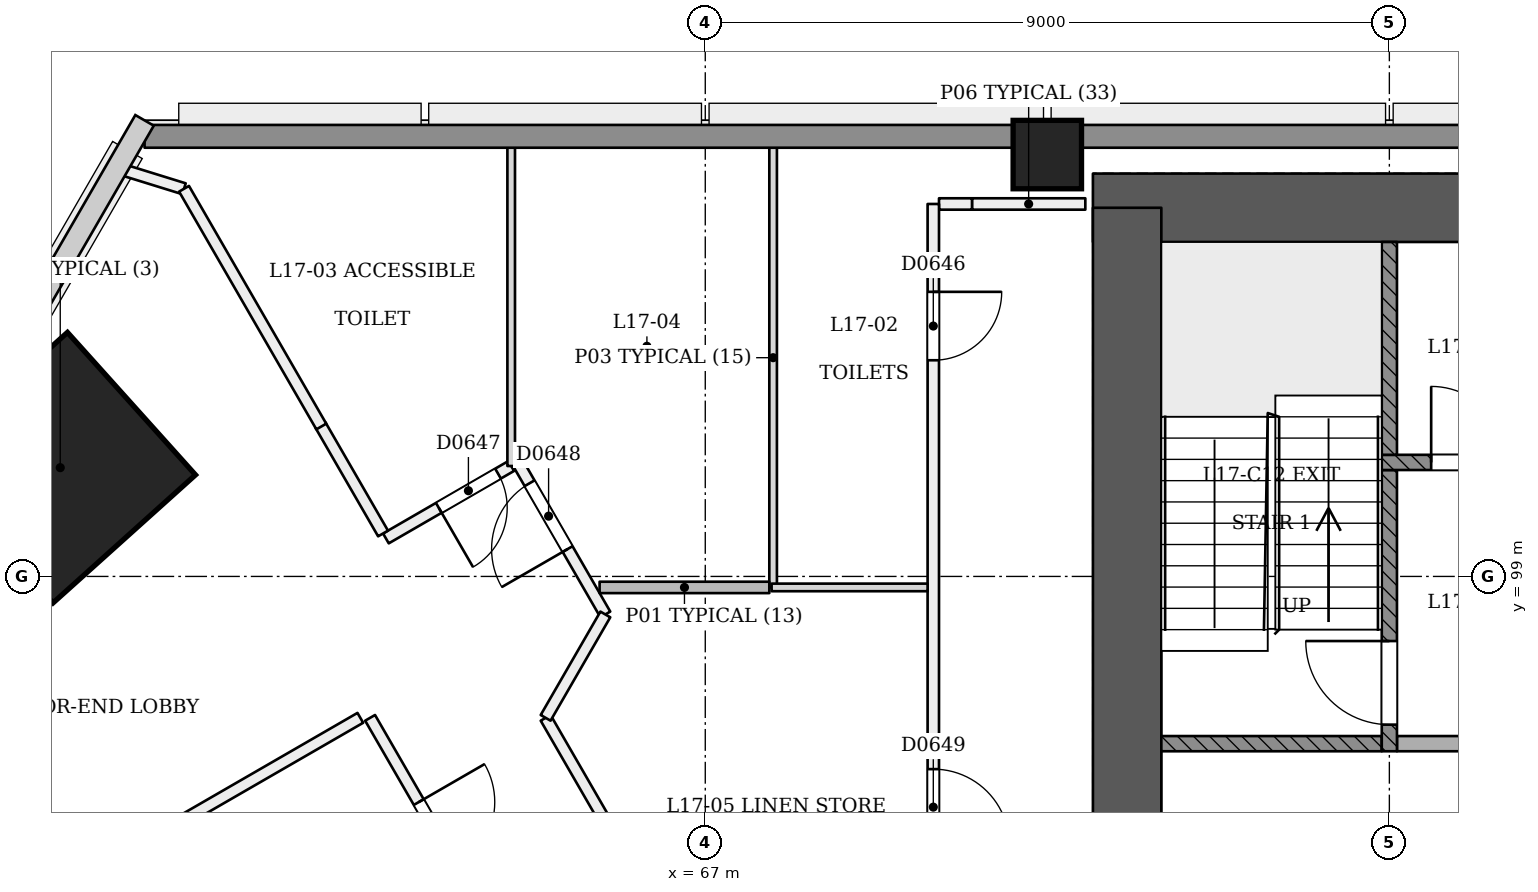
"""IFC4 building model, lengths in metres.
Left out: names, types, materials, properties, quantities, classifications, styles, units other than length and angle.
Written with IfcOpenShell. Run it as: python <this file> out.ifc"""

import sys

from ifc_helpers import new_model, si_unit, direction, frame, frame_2d, origin, origin_2d, place, context, subcontext, project, spatial, rectangle, extrude, element, fill, save


model = new_model("IFC4")
c1 = context("Model", 3, precision=1e-05, world=origin(), true_north=direction((0.0, 1.0)))
c2 = subcontext(c1, "Body", "Model", "MODEL_VIEW")
j1 = project(units=[si_unit("LENGTHUNIT", "METRE"), si_unit("PLANEANGLEUNIT", "RADIAN")], contexts=[c1])
p1 = place(None, origin())
s1 = spatial("IfcSite", under=j1, at=p1, CompositionType="ELEMENT")
p2 = place(p1, origin())
s2 = spatial("IfcBuilding", under=s1, at=p2, CompositionType="ELEMENT")
p3 = place(p2, frame((0.0, 0.0, 70.2)))
s3 = spatial("IfcBuildingStorey", under=s2, at=p3, CompositionType="ELEMENT", Elevation=70.2)
p4 = place(p3, frame((97.45, 103.85, 0.0), z_axis=(0.0, 0.0, 1.0), x_axis=(-1.0, 0.0, 0.0)))
e1 = element("IfcWall", 1, at=p4, inside=s3, PredefinedType="SHEAR", context=c2, shape_type="SweptSolid", body=[
    extrude(rectangle(XDim=25.35, YDim=0.9, at=frame_2d((12.675, 0.0))), origin(), (0.0, 0.0, 1.0), 3.6),
])
p5 = place(p3, frame((72.55, 103.85, 0.0), z_axis=(0.0, 0.0, 1.0), x_axis=(0.0, -1.0, 0.0)))
e2 = element("IfcWall", 2, at=p5, inside=s3, PredefinedType="SHEAR", context=c2, shape_type="SweptSolid", body=[
    extrude(rectangle(XDim=11.35, YDim=0.9, at=frame_2d((5.675, 0.0))), origin(), (0.0, 0.0, 1.0), 3.6),
])
p6 = place(p3, frame((58.48, 100.42, 0.0), z_axis=(0.028401814599, 0.009218727412, 0.999554076572), x_axis=(-0.865120105842, 0.501167447702, 0.019959755287)))
e3 = element("IfcColumn", 3, at=p6, inside=s3, PredefinedType="COLUMN", context=c2, shape_type="SweptSolid", body=[
    extrude(rectangle(XDim=2.52, YDim=2.52, at=origin_2d()), origin(), (0.0, 0.0, 1.0), 3.602),
])
p7 = place(p3, frame((71.5, 104.55, 0.0), z_axis=(0.0, 0.0, 1.0), x_axis=(1.0, 0.0, 0.0)))
e4 = element("IfcColumn", 4, at=p7, inside=s3, PredefinedType="COLUMN", context=c2, shape_type="SweptSolid", body=[
    extrude(rectangle(XDim=0.9, YDim=0.9, at=origin_2d()), origin(), (0.0, 0.0, 1.0), 3.6),
])
p8 = place(p3, frame((72.0, 103.9, 0.0), z_axis=(0.0, 0.0, 1.0), x_axis=(-1.0, 0.0, 0.0)))
e5 = element("IfcWall", 5, at=p8, inside=s3, PredefinedType="PARTITIONING", context=c2, shape_type="SweptSolid", body=[
    extrude(rectangle(XDim=1.491, YDim=0.15, at=frame_2d((0.746, 0.0))), origin(), (0.0, 0.0, 1.0), 3.1),
])
p9 = place(p3, frame((70.509, 103.9, 0.0), z_axis=(0.0, 0.0, 1.0), x_axis=(-1.0, 0.0, 0.0)))
e6 = element("IfcWall", 6, at=p9, inside=s3, PredefinedType="PARTITIONING", context=c2, shape_type="SweptSolid", body=[
    extrude(rectangle(XDim=0.434, YDim=0.15, at=frame_2d((0.217, 0.0))), origin(), (0.0, 0.0, 1.0), 2.6),
])
p10 = place(p3, frame((64.447, 100.453, 0.0), z_axis=(0.0, 0.0, 1.0), x_axis=(-0.865753934511, -0.500469904069, 0.0)))
e7 = element("IfcWall", 7, at=p10, inside=s3, PredefinedType="PARTITIONING", context=c2, shape_type="SweptSolid", body=[
    extrude(rectangle(XDim=1.904, YDim=0.15, at=frame_2d((0.952, 0.0))), origin(), (0.0, 0.0, 1.0), 3.1),
])
p11 = place(p10, frame((0.2, 0.0, 0.0)))
e8 = element("IfcOpeningElement", 8, at=p11, cuts=e7, PredefinedType="OPENING", context=c2, shape_type="SweptSolid", body=[
    extrude(rectangle(XDim=0.9, YDim=2.1, at=frame_2d((0.45, 1.05))), frame((0.0, 0.085, 0.0), z_axis=(0.0, -1.0, 0.0), x_axis=(1.0, 0.0, 0.0)), (0.0, 0.0, 1.0), 0.171),
])
p12 = place(p3, frame((62.761, 99.565, 0.0), z_axis=(0.0, 0.0, 1.0), x_axis=(-0.50001794124, 0.866015045157, 0.0)))
e9 = element("IfcWall", 9, at=p12, inside=s3, PredefinedType="PARTITIONING", context=c2, shape_type="SweptSolid", body=[
    extrude(rectangle(XDim=1.645, YDim=0.15, at=frame_2d((0.823, 0.0))), origin(), (0.0, 0.0, 1.0), 3.1),
])
p13 = place(p3, frame((65.685, 98.5, 0.0), z_axis=(0.0, 0.0, 1.0), x_axis=(-0.500027479704, 0.866009537788, 0.0)))
e10 = element("IfcWall", 10, at=p13, inside=s3, PredefinedType="PARTITIONING", context=c2, shape_type="SweptSolid", body=[
    extrude(rectangle(XDim=2.309, YDim=0.15, at=frame_2d((1.155, 0.0))), origin(), (0.0, 0.0, 1.0), 3.1),
])
p14 = place(p13, frame((0.993, 0.0, 0.0)))
e11 = element("IfcOpeningElement", 11, at=p14, cuts=e10, PredefinedType="OPENING", context=c2, shape_type="SweptSolid", body=[
    extrude(rectangle(XDim=1.0, YDim=2.1, at=frame_2d((0.5, 1.05))), frame((0.0, 0.085, 0.0), z_axis=(0.0, -1.0, 0.0), x_axis=(1.0, 0.0, 0.0)), (0.0, 0.0, 1.0), 0.171),
])
p15 = place(p3, frame((70.0, 103.9, 0.0), z_axis=(0.0, 0.0, 1.0), x_axis=(0.0, -1.0, 0.0)))
e12 = element("IfcWall", 12, at=p15, inside=s3, PredefinedType="PARTITIONING", context=c2, shape_type="SweptSolid", body=[
    extrude(rectangle(XDim=11.5, YDim=0.15, at=frame_2d((5.75, 0.0))), origin(), (0.0, 0.0, 1.0), 2.6),
])
p16 = place(p15, frame((1.156, 0.0, 0.0)))
e13 = element("IfcOpeningElement", 13, at=p16, cuts=e12, PredefinedType="OPENING", context=c2, shape_type="SweptSolid", body=[
    extrude(rectangle(XDim=0.9, YDim=2.1, at=frame_2d((0.45, 1.05))), frame((0.0, 0.085, 0.0), z_axis=(0.0, -1.0, 0.0), x_axis=(1.0, 0.0, 0.0)), (0.0, 0.0, 1.0), 0.171),
])
p17 = place(p15, frame((7.435, 0.0, 0.0)))
e14 = element("IfcOpeningElement", 14, at=p17, cuts=e12, PredefinedType="OPENING", context=c2, shape_type="SweptSolid", body=[
    extrude(rectangle(XDim=1.0, YDim=2.1, at=frame_2d((0.5, 1.05))), frame((0.0, 0.085, 0.0), z_axis=(0.0, -1.0, 0.0), x_axis=(1.0, 0.0, 0.0)), (0.0, 0.0, 1.0), 0.171),
])
p18 = place(p3, frame((67.636, 92.4, 0.0), z_axis=(0.0, 0.0, 1.0), x_axis=(-0.499977311951, 0.866038502339, 0.0)))
e15 = element("IfcWall", 15, at=p18, inside=s3, PredefinedType="PARTITIONING", context=c2, shape_type="SweptSolid", body=[
    extrude(rectangle(XDim=5.473, YDim=0.15, at=frame_2d((2.736, 0.0))), origin(), (0.0, 0.0, 1.0), 3.1),
])
p19 = place(p3, frame((64.9, 97.14, 0.0), z_axis=(0.0, 0.0, 1.0), x_axis=(0.500000501253, 0.866025114386, 0.0)))
e16 = element("IfcWall", 16, at=p19, inside=s3, PredefinedType="PARTITIONING", context=c2, shape_type="SweptSolid", body=[
    extrude(rectangle(XDim=1.571, YDim=0.15, at=frame_2d((0.785, 0.0))), origin(), (0.0, 0.0, 1.0), 3.1),
])
p20 = place(p3, frame((62.59, 97.14, 0.0), z_axis=(0.0, 0.0, 1.0), x_axis=(0.500002288388, -0.866024082579, 0.0)))
e17 = element("IfcWall", 17, at=p20, inside=s3, PredefinedType="PARTITIONING", context=c2, shape_type="SweptSolid", body=[
    extrude(rectangle(XDim=43.248, YDim=0.15, at=frame_2d((21.624, 0.0))), origin(), (0.0, 0.0, 1.0), 2.7),
])
p21 = place(p20, frame((1.28, 0.0, 0.0)))
e18 = element("IfcOpeningElement", 18, at=p21, cuts=e17, PredefinedType="OPENING", context=c2, shape_type="SweptSolid", body=[
    extrude(rectangle(XDim=1.0, YDim=2.1, at=frame_2d((0.5, 1.05))), frame((0.0, 0.085, 0.0), z_axis=(0.0, -1.0, 0.0), x_axis=(1.0, 0.0, 0.0)), (0.0, 0.0, 1.0), 0.171),
])
p22 = place(p20, frame((4.195, 0.0, 0.0)))
e19 = element("IfcOpeningElement", 19, at=p22, cuts=e17, PredefinedType="OPENING", context=c2, shape_type="SweptSolid", body=[
    extrude(rectangle(XDim=1.1, YDim=2.1, at=frame_2d((0.55, 1.05))), frame((0.0, 0.085, 0.0), z_axis=(0.0, -1.0, 0.0), x_axis=(1.0, 0.0, 0.0)), (0.0, 0.0, 1.0), 0.171),
])
p23 = place(p20, frame((10.904, 0.0, 0.0)))
e20 = element("IfcOpeningElement", 20, at=p23, cuts=e17, PredefinedType="OPENING", context=c2, shape_type="SweptSolid", body=[
    extrude(rectangle(XDim=1.0, YDim=2.1, at=frame_2d((0.5, 1.05))), frame((0.0, 0.085, 0.0), z_axis=(0.0, -1.0, 0.0), x_axis=(1.0, 0.0, 0.0)), (0.0, 0.0, 1.0), 0.171),
])
p24 = place(p20, frame((17.624, 0.0, 0.0)))
e21 = element("IfcOpeningElement", 21, at=p24, cuts=e17, PredefinedType="OPENING", context=c2, shape_type="SweptSolid", body=[
    extrude(rectangle(XDim=1.2, YDim=2.1, at=frame_2d((0.6, 1.05))), frame((0.0, 0.085, 0.0), z_axis=(0.0, -1.0, 0.0), x_axis=(1.0, 0.0, 0.0)), (0.0, 0.0, 1.0), 0.171),
])
p25 = place(p20, frame((22.229, 0.0, 0.0)))
e22 = element("IfcOpeningElement", 22, at=p25, cuts=e17, PredefinedType="OPENING", context=c2, shape_type="SweptSolid", body=[
    extrude(rectangle(XDim=1.0, YDim=2.1, at=frame_2d((0.5, 1.05))), frame((0.0, 0.085, 0.0), z_axis=(0.0, -1.0, 0.0), x_axis=(1.0, 0.0, 0.0)), (0.0, 0.0, 1.0), 0.171),
])
p26 = place(p20, frame((28.904, 0.0, 0.0)))
e23 = element("IfcOpeningElement", 23, at=p26, cuts=e17, PredefinedType="OPENING", context=c2, shape_type="SweptSolid", body=[
    extrude(rectangle(XDim=1.0, YDim=2.1, at=frame_2d((0.5, 1.05))), frame((0.0, 0.085, 0.0), z_axis=(0.0, -1.0, 0.0), x_axis=(1.0, 0.0, 0.0)), (0.0, 0.0, 1.0), 0.171),
])
p27 = place(p20, frame((32.374, 0.0, 0.0)))
e24 = element("IfcOpeningElement", 24, at=p27, cuts=e17, PredefinedType="OPENING", context=c2, shape_type="SweptSolid", body=[
    extrude(rectangle(XDim=1.0, YDim=2.1, at=frame_2d((0.5, 1.05))), frame((0.0, 0.085, 0.0), z_axis=(0.0, -1.0, 0.0), x_axis=(1.0, 0.0, 0.0)), (0.0, 0.0, 1.0), 0.171),
])
p28 = place(p20, frame((38.618, 0.0, 0.0)))
e25 = element("IfcOpeningElement", 25, at=p28, cuts=e17, PredefinedType="OPENING", context=c2, shape_type="SweptSolid", body=[
    extrude(rectangle(XDim=1.2, YDim=2.1, at=frame_2d((0.6, 1.05))), frame((0.0, 0.085, 0.0), z_axis=(0.0, -1.0, 0.0), x_axis=(1.0, 0.0, 0.0)), (0.0, 0.0, 1.0), 0.171),
])
p29 = place(p3, frame((67.893, 104.9, 0.0), z_axis=(0.0, 0.0, 1.0), x_axis=(0.0, -1.0, 0.0)))
e26 = element("IfcWall", 26, at=p29, inside=s3, PredefinedType="PARTITIONING", context=c2, shape_type="SweptSolid", body=[
    extrude(rectangle(XDim=6.044, YDim=0.1, at=frame_2d((3.022, 0.0))), origin(), (0.0, 0.0, 1.0), 2.6),
])
p30 = place(p3, frame((67.873, 98.855, 0.0), z_axis=(0.0, 0.0, 1.0), x_axis=(1.0, 0.0, 0.0)))
e27 = element("IfcWall", 27, at=p30, inside=s3, PredefinedType="PARTITIONING", context=c2, shape_type="SweptSolid", body=[
    extrude(rectangle(XDim=2.052, YDim=0.1, at=frame_2d((1.026, 0.0))), origin(), (0.0, 0.0, 1.0), 3.1),
])
p31 = place(p3, frame((64.447, 100.453, 0.0), z_axis=(0.0, 0.0, 1.0), x_axis=(0.0, 1.0, 0.0)))
e28 = element("IfcWall", 28, at=p31, inside=s3, PredefinedType="PARTITIONING", context=c2, shape_type="SweptSolid", body=[
    extrude(rectangle(XDim=4.447, YDim=0.1, at=frame_2d((2.224, 0.0))), origin(), (0.0, 0.0, 1.0), 2.6),
])
p32 = place(p3, frame((59.339, 104.349, 0.0), z_axis=(0.0, 0.0, 1.0), x_axis=(0.955225394117, -0.295879107804, 0.0)))
e29 = element("IfcWall", 29, at=p32, inside=s3, PredefinedType="PARTITIONING", context=c2, shape_type="SweptSolid", body=[
    extrude(rectangle(XDim=0.842, YDim=0.15, at=frame_2d((0.421, 0.0))), origin(), (0.0, 0.0, 1.0), 3.1),
])
p33 = place(p3, frame((60.143, 104.1, 0.0), z_axis=(0.0, 0.0, 1.0), x_axis=(0.499999409447, -0.86602574474, 0.0)))
e30 = element("IfcWall", 30, at=p33, inside=s3, PredefinedType="PARTITIONING", context=c2, shape_type="SweptSolid", body=[
    extrude(rectangle(XDim=3.612, YDim=0.15, at=frame_2d((1.806, 0.0))), origin(), (0.0, 0.0, 1.0), 2.6),
])
p34 = place(p3, frame((65.61, 98.855, 0.0), z_axis=(0.0, 0.0, 1.0), x_axis=(1.0, 0.0, 0.0)))
e31 = element("IfcWall", 31, at=p34, inside=s3, PredefinedType="PARTITIONING", context=c2, shape_type="SweptSolid", body=[
    extrude(rectangle(XDim=2.233, YDim=0.15, at=frame_2d((1.116, 0.0))), origin(), (0.0, 0.0, 1.0), 3.1),
])
p35 = place(p3, frame((56.998, 93.985, 0.0), z_axis=(0.0, 0.0, 1.0), x_axis=(0.866017388547, 0.500013882542, 0.0)))
e32 = element("IfcWall", 32, at=p35, inside=s3, PredefinedType="PARTITIONING", context=c2, shape_type="SweptSolid", body=[
    extrude(rectangle(XDim=6.309, YDim=0.15, at=frame_2d((3.154, 0.0))), origin(), (0.0, 0.0, 1.0), 2.6),
])
p36 = place(p3, frame((59.623, 104.79, 0.0), z_axis=(0.0, 0.0, 1.0), x_axis=(1.0, 0.0, 0.0)))
e33 = element("IfcWall", 33, at=p36, inside=s3, PredefinedType="SOLIDWALL", context=c2, shape_type="SweptSolid", body=[
    extrude(rectangle(XDim=50.754, YDim=0.3, at=frame_2d((25.377, 0.0))), origin(), (0.0, 0.0, 1.0), 2.6),
])
p37 = place(p3, frame((73.0, 96.8, 0.0), z_axis=(0.0, 0.0, 1.0), x_axis=(1.0, 0.0, 0.0)))
e34 = element("IfcWall", 34, at=p37, inside=s3, PredefinedType="SOLIDWALL", context=c2, shape_type="SweptSolid", body=[
    extrude(rectangle(XDim=2.9, YDim=0.2, at=frame_2d((1.45, 0.0))), origin(), (0.0, 0.0, 1.0), 3.1),
])
p38 = place(p3, frame((76.0, 96.7, 0.0), z_axis=(0.0, 0.0, 1.0), x_axis=(0.0, 1.0, 0.0)))
e35 = element("IfcWall", 35, at=p38, inside=s3, PredefinedType="SOLIDWALL", context=c2, shape_type="SweptSolid", body=[
    extrude(rectangle(XDim=3.7, YDim=0.2, at=frame_2d((1.85, 0.0))), origin(), (0.0, 0.0, 1.0), 3.1),
])
p39 = place(p38, frame((0.35, 0.0, 0.0)))
e36 = element("IfcOpeningElement", 36, at=p39, cuts=e35, PredefinedType="OPENING", context=c2, shape_type="SweptSolid", body=[
    extrude(rectangle(XDim=1.1, YDim=2.1, at=frame_2d((0.55, 1.05))), frame((0.0, 0.11, 0.0), z_axis=(0.0, -1.0, 0.0), x_axis=(1.0, 0.0, 0.0)), (0.0, 0.0, 1.0), 0.221),
])
p40 = place(p3, frame((76.1, 96.8, 0.0), z_axis=(0.0, 0.0, 1.0), x_axis=(1.0, 0.0, 0.0)))
e37 = element("IfcWall", 37, at=p40, inside=s3, PredefinedType="PARTITIONING", context=c2, shape_type="SweptSolid", body=[
    extrude(rectangle(XDim=1.9, YDim=0.2, at=frame_2d((0.95, 0.0))), origin(), (0.0, 0.0, 1.0), 3.1),
])
p41 = place(p3, frame((75.9, 100.5, 0.0), z_axis=(0.0, 0.0, 1.0), x_axis=(1.0, 0.0, 0.0)))
e38 = element("IfcWall", 38, at=p41, inside=s3, PredefinedType="SOLIDWALL", context=c2, shape_type="SweptSolid", body=[
    extrude(rectangle(XDim=18.2, YDim=0.2, at=frame_2d((9.1, 0.0))), origin(), (0.0, 0.0, 1.0), 3.1),
])
p42 = place(p41, frame((2.6, 0.0, 0.0)))
e39 = element("IfcOpeningElement", 39, at=p42, cuts=e38, PredefinedType="OPENING", context=c2, shape_type="SweptSolid", body=[
    extrude(rectangle(XDim=1.1, YDim=2.1, at=frame_2d((0.55, 1.05))), frame((0.0, 0.11, 0.0), z_axis=(0.0, -1.0, 0.0), x_axis=(1.0, 0.0, 0.0)), (0.0, 0.0, 1.0), 0.221),
])
p43 = place(p41, frame((4.5, 0.0, 0.0)))
e40 = element("IfcOpeningElement", 40, at=p43, cuts=e38, PredefinedType="OPENING", context=c2, shape_type="SweptSolid", body=[
    extrude(rectangle(XDim=1.1, YDim=2.1, at=frame_2d((0.55, 1.05))), frame((0.0, 0.11, 0.0), z_axis=(0.0, -1.0, 0.0), x_axis=(1.0, 0.0, 0.0)), (0.0, 0.0, 1.0), 0.221),
])
p44 = place(p41, frame((6.4, 0.0, 0.0)))
e41 = element("IfcOpeningElement", 41, at=p44, cuts=e38, PredefinedType="OPENING", context=c2, shape_type="SweptSolid", body=[
    extrude(rectangle(XDim=1.1, YDim=2.1, at=frame_2d((0.55, 1.05))), frame((0.0, 0.11, 0.0), z_axis=(0.0, -1.0, 0.0), x_axis=(1.0, 0.0, 0.0)), (0.0, 0.0, 1.0), 0.221),
])
p45 = place(p41, frame((8.3, 0.0, 0.0)))
e42 = element("IfcOpeningElement", 42, at=p45, cuts=e38, PredefinedType="OPENING", context=c2, shape_type="SweptSolid", body=[
    extrude(rectangle(XDim=1.1, YDim=2.1, at=frame_2d((0.55, 1.05))), frame((0.0, 0.11, 0.0), z_axis=(0.0, -1.0, 0.0), x_axis=(1.0, 0.0, 0.0)), (0.0, 0.0, 1.0), 0.221),
])
p46 = place(p41, frame((10.2, 0.0, 0.0)))
e43 = element("IfcOpeningElement", 43, at=p46, cuts=e38, PredefinedType="OPENING", context=c2, shape_type="SweptSolid", body=[
    extrude(rectangle(XDim=1.1, YDim=2.1, at=frame_2d((0.55, 1.05))), frame((0.0, 0.11, 0.0), z_axis=(0.0, -1.0, 0.0), x_axis=(1.0, 0.0, 0.0)), (0.0, 0.0, 1.0), 0.221),
])
p47 = place(p41, frame((12.1, 0.0, 0.0)))
e44 = element("IfcOpeningElement", 44, at=p47, cuts=e38, PredefinedType="OPENING", context=c2, shape_type="SweptSolid", body=[
    extrude(rectangle(XDim=1.1, YDim=2.1, at=frame_2d((0.55, 1.05))), frame((0.0, 0.11, 0.0), z_axis=(0.0, -1.0, 0.0), x_axis=(1.0, 0.0, 0.0)), (0.0, 0.0, 1.0), 0.221),
])
p48 = place(p41, frame((14.0, 0.0, 0.0)))
e45 = element("IfcOpeningElement", 45, at=p48, cuts=e38, PredefinedType="OPENING", context=c2, shape_type="SweptSolid", body=[
    extrude(rectangle(XDim=1.1, YDim=2.1, at=frame_2d((0.55, 1.05))), frame((0.0, 0.11, 0.0), z_axis=(0.0, -1.0, 0.0), x_axis=(1.0, 0.0, 0.0)), (0.0, 0.0, 1.0), 0.221),
])
p49 = place(p41, frame((0.65, 0.0, 0.0)))
e46 = element("IfcOpeningElement", 46, at=p49, cuts=e38, PredefinedType="OPENING", context=c2, shape_type="SweptSolid", body=[
    extrude(rectangle(XDim=1.0, YDim=2.1, at=frame_2d((0.5, 1.05))), frame((0.0, 0.11, 0.0), z_axis=(0.0, -1.0, 0.0), x_axis=(1.0, 0.0, 0.0)), (0.0, 0.0, 1.0), 0.221),
])
p50 = place(p41, frame((16.3, 0.0, 0.0)))
e47 = element("IfcOpeningElement", 47, at=p50, cuts=e38, PredefinedType="OPENING", context=c2, shape_type="SweptSolid", body=[
    extrude(rectangle(XDim=1.0, YDim=2.1, at=frame_2d((0.5, 1.05))), frame((0.0, 0.11, 0.0), z_axis=(0.0, -1.0, 0.0), x_axis=(1.0, 0.0, 0.0)), (0.0, 0.0, 1.0), 0.221),
])
p51 = place(p3, frame((76.0, 100.6, 0.0), z_axis=(0.0, 0.0, 1.0), x_axis=(0.0, 1.0, 0.0)))
e48 = element("IfcWall", 48, at=p51, inside=s3, PredefinedType="SOLIDWALL", context=c2, shape_type="SweptSolid", body=[
    extrude(rectangle(XDim=2.8, YDim=0.2, at=frame_2d((1.4, 0.0))), origin(), (0.0, 0.0, 1.0), 3.1),
])
p52 = place(p16, origin())
e49 = element("IfcDoor", 49, at=p52, inside=s3, OperationType="SINGLE_SWING_LEFT", PredefinedType="NOTDEFINED", context=c2, shape_type="SweptSolid", body=[
    extrude(rectangle(XDim=0.9, YDim=2.1, at=frame_2d((0.45, 1.05))), frame((0.0, 0.025, 0.0), z_axis=(0.0, -1.0, 0.0), x_axis=(1.0, 0.0, 0.0)), (0.0, 0.0, 1.0), 0.05),
])
fill(e13, e49)
p53 = place(p11, origin())
e50 = element("IfcDoor", 50, at=p53, inside=s3, OperationType="SINGLE_SWING_RIGHT", PredefinedType="NOTDEFINED", context=c2, shape_type="SweptSolid", body=[
    extrude(rectangle(XDim=0.9, YDim=2.1, at=frame_2d((0.45, 1.05))), frame((0.0, 0.025, 0.0), z_axis=(0.0, -1.0, 0.0), x_axis=(1.0, 0.0, 0.0)), (0.0, 0.0, 1.0), 0.05),
])
fill(e8, e50)
p54 = place(p14, origin())
e51 = element("IfcDoor", 51, at=p54, inside=s3, OperationType="SINGLE_SWING_LEFT", PredefinedType="NOTDEFINED", context=c2, shape_type="SweptSolid", body=[
    extrude(rectangle(XDim=1.0, YDim=2.1, at=frame_2d((0.5, 1.05))), frame((0.0, 0.025, 0.0), z_axis=(0.0, -1.0, 0.0), x_axis=(1.0, 0.0, 0.0)), (0.0, 0.0, 1.0), 0.05),
])
fill(e11, e51)
p55 = place(p17, origin())
e52 = element("IfcDoor", 52, at=p55, inside=s3, OperationType="SINGLE_SWING_RIGHT", PredefinedType="NOTDEFINED", context=c2, shape_type="SweptSolid", body=[
    extrude(rectangle(XDim=1.0, YDim=2.1, at=frame_2d((0.5, 1.05))), frame((0.0, 0.025, 0.0), z_axis=(0.0, -1.0, 0.0), x_axis=(1.0, 0.0, 0.0)), (0.0, 0.0, 1.0), 0.05),
])
fill(e14, e52)
p56 = place(p21, origin())
e53 = element("IfcDoor", 53, at=p56, inside=s3, OperationType="SINGLE_SWING_LEFT", PredefinedType="NOTDEFINED", context=c2, shape_type="SweptSolid", body=[
    extrude(rectangle(XDim=1.0, YDim=2.1, at=frame_2d((0.5, 1.05))), frame((0.0, 0.025, 0.0), z_axis=(0.0, -1.0, 0.0), x_axis=(1.0, 0.0, 0.0)), (0.0, 0.0, 1.0), 0.05),
])
fill(e18, e53)
p57 = place(p39, origin())
e54 = element("IfcDoor", 54, at=p57, inside=s3, OperationType="SINGLE_SWING_RIGHT", PredefinedType="NOTDEFINED", context=c2, shape_type="SweptSolid", body=[
    extrude(rectangle(XDim=1.1, YDim=2.1, at=frame_2d((0.55, 1.05))), frame((0.0, 0.025, 0.0), z_axis=(0.0, -1.0, 0.0), x_axis=(1.0, 0.0, 0.0)), (0.0, 0.0, 1.0), 0.05),
])
fill(e36, e54)
p58 = place(p49, origin())
e55 = element("IfcDoor", 55, at=p58, inside=s3, OperationType="SINGLE_SWING_LEFT", PredefinedType="NOTDEFINED", context=c2, shape_type="SweptSolid", body=[
    extrude(rectangle(XDim=1.0, YDim=2.1, at=frame_2d((0.5, 1.05))), frame((0.0, 0.025, 0.0), z_axis=(0.0, -1.0, 0.0), x_axis=(1.0, 0.0, 0.0)), (0.0, 0.0, 1.0), 0.05),
])
fill(e46, e55)
save(model, sys.argv[1])
